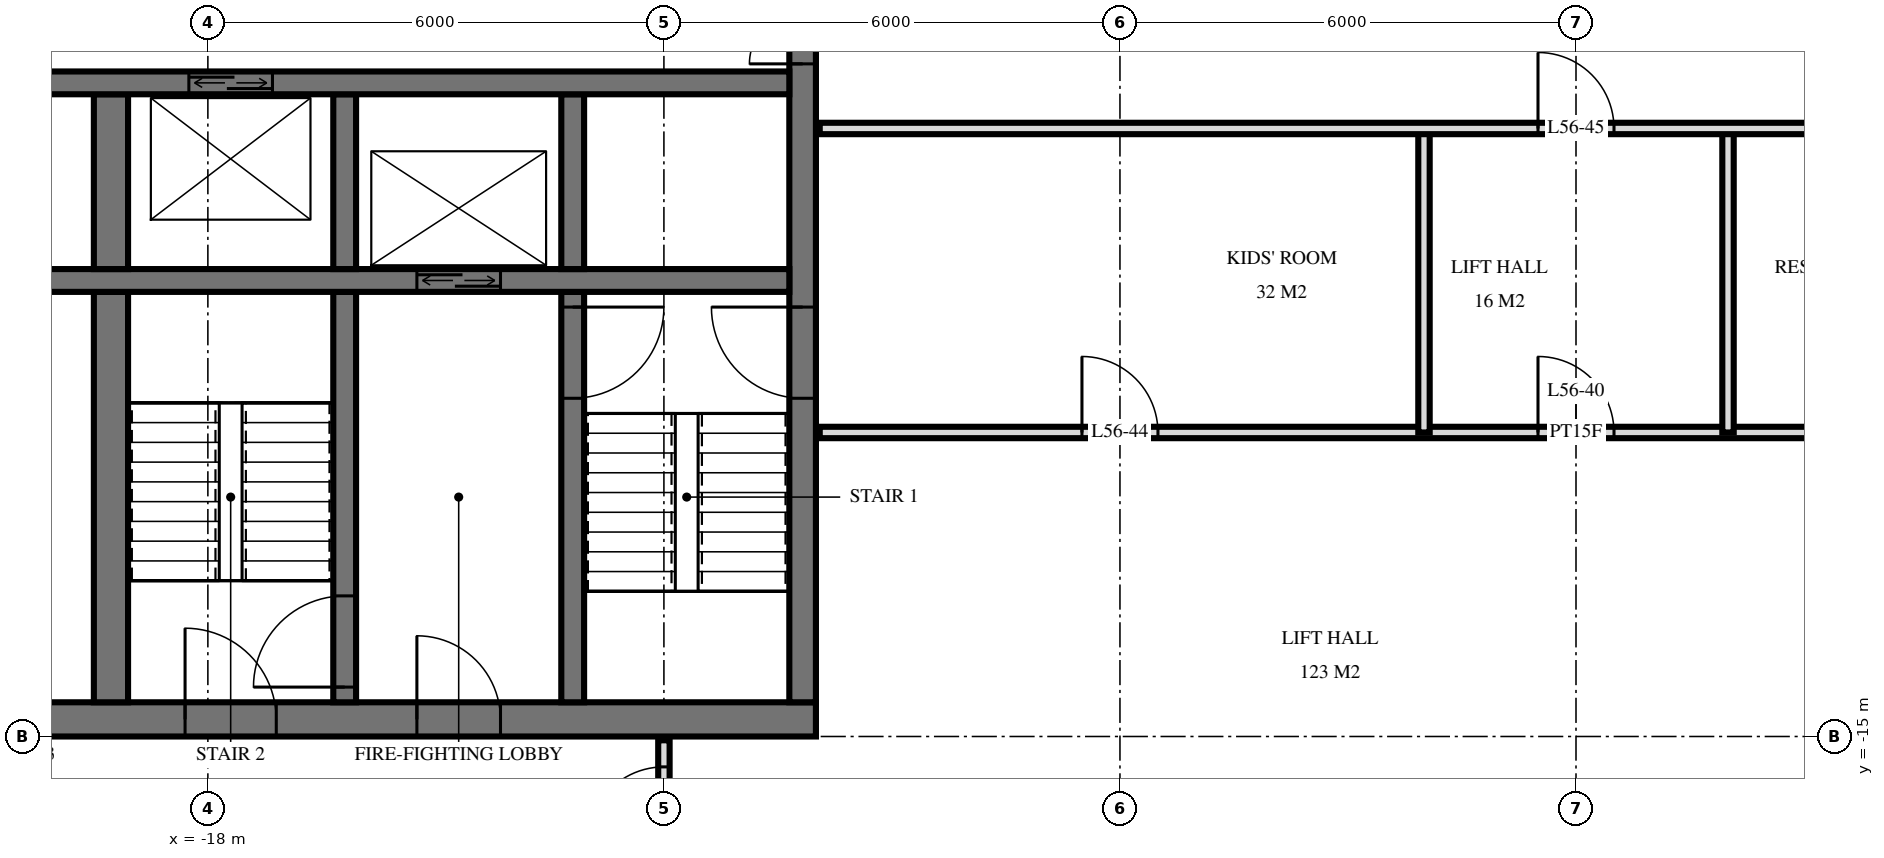
"""IFC4 building model, lengths in metres.
Left out: names, types, materials, properties, quantities, classifications, styles, units other than length and angle.
Written with IfcOpenShell. Run it as: python <this file> out.ifc"""

import sys

from ifc_helpers import new_model, si_unit, direction, frame, frame_2d, origin, place, context, subcontext, project, spatial, rectangle, extrude, element, fill, save


model = new_model("IFC4")
c1 = context("Model", 3, precision=1e-05, world=origin(), true_north=direction((0.0, 1.0)))
c2 = subcontext(c1, "Body", "Model", "MODEL_VIEW")
j1 = project(units=[si_unit("LENGTHUNIT", "METRE"), si_unit("PLANEANGLEUNIT", "RADIAN")], contexts=[c1])
p1 = place(None, origin())
s1 = spatial("IfcSite", under=j1, at=p1, CompositionType="ELEMENT")
p2 = place(p1, origin())
s2 = spatial("IfcBuilding", under=s1, at=p2, CompositionType="ELEMENT")
p3 = place(p2, frame((0.0, 0.0, 215.1)))
s3 = spatial("IfcBuildingStorey", under=s2, at=p3, CompositionType="ELEMENT", Elevation=215.1)
p4 = place(p3, frame((-24.5, -14.775, 0.0), z_axis=(0.0, 0.0, 1.0), x_axis=(1.0, 0.0, 0.0)))
e1 = element("IfcWall", 1, at=p4, inside=s3, PredefinedType="SHEAR", context=c2, shape_type="SweptSolid", body=[
    extrude(rectangle(XDim=14.5, YDim=0.45, at=frame_2d((7.25, 0.0))), origin(), (0.0, 0.0, 1.0), 3.5),
])
p5 = place(p4, frame((6.2, 0.0, 0.0)))
e2 = element("IfcOpeningElement", 2, at=p5, cuts=e1, PredefinedType="OPENING", context=c2, shape_type="SweptSolid", body=[
    extrude(rectangle(XDim=1.2, YDim=2.1, at=frame_2d((0.6, 1.05))), frame((0.0, 0.235, 0.0), z_axis=(0.0, -1.0, 0.0), x_axis=(1.0, 0.0, 0.0)), (0.0, 0.0, 1.0), 0.47),
])
p6 = place(p4, frame((9.25, 0.0, 0.0)))
e3 = element("IfcOpeningElement", 3, at=p6, cuts=e1, PredefinedType="OPENING", context=c2, shape_type="SweptSolid", body=[
    extrude(rectangle(XDim=1.1, YDim=2.1, at=frame_2d((0.55, 1.05))), frame((0.0, 0.235, 0.0), z_axis=(0.0, -1.0, 0.0), x_axis=(1.0, 0.0, 0.0)), (0.0, 0.0, 1.0), 0.47),
])
p7 = place(p4, frame((3.5, 0.0, 0.0)))
e4 = element("IfcOpeningElement", 4, at=p7, cuts=e1, PredefinedType="OPENING", context=c2, shape_type="SweptSolid", body=[
    extrude(rectangle(XDim=0.9, YDim=2.1, at=frame_2d((0.45, 1.05))), frame((0.0, 0.235, 0.0), z_axis=(0.0, -1.0, 0.0), x_axis=(1.0, 0.0, 0.0)), (0.0, 0.0, 1.0), 0.47),
])
p8 = place(p4, frame((1.05, 0.0, 0.0)))
e5 = element("IfcOpeningElement", 5, at=p8, cuts=e1, PredefinedType="OPENING", context=c2, shape_type="SweptSolid", body=[
    extrude(rectangle(XDim=1.0, YDim=2.1, at=frame_2d((0.5, 1.05))), frame((0.0, 0.235, 0.0), z_axis=(0.0, -1.0, 0.0), x_axis=(1.0, 0.0, 0.0)), (0.0, 0.0, 1.0), 0.47),
])
p9 = place(p3, frame((-10.175, -14.55, 0.0), z_axis=(0.0, 0.0, 1.0), x_axis=(0.0, 1.0, 0.0)))
e6 = element("IfcWall", 6, at=p9, inside=s3, PredefinedType="SHEAR", context=c2, shape_type="SweptSolid", body=[
    extrude(rectangle(XDim=14.1, YDim=0.35, at=frame_2d((7.05, 0.0))), origin(), (0.0, 0.0, 1.0), 3.5),
])
p10 = place(p9, frame((8.4, 0.0, 0.0)))
e7 = element("IfcOpeningElement", 7, at=p10, cuts=e6, PredefinedType="OPENING", context=c2, shape_type="SweptSolid", body=[
    extrude(rectangle(XDim=1.4, YDim=2.4, at=frame_2d((0.7, 1.2))), frame((0.0, 0.185, 0.0), z_axis=(0.0, -1.0, 0.0), x_axis=(1.0, 0.0, 0.0)), (0.0, 0.0, 1.0), 0.37),
])
p11 = place(p9, frame((10.0, 0.0, 0.0)))
e8 = element("IfcOpeningElement", 8, at=p11, cuts=e6, PredefinedType="OPENING", context=c2, shape_type="SweptSolid", body=[
    extrude(rectangle(XDim=1.4, YDim=2.4, at=frame_2d((0.7, 1.2))), frame((0.0, 0.185, 0.0), z_axis=(0.0, -1.0, 0.0), x_axis=(1.0, 0.0, 0.0)), (0.0, 0.0, 1.0), 0.37),
])
p12 = place(p9, frame((4.0, 0.0, 0.0)))
e9 = element("IfcOpeningElement", 9, at=p12, cuts=e6, PredefinedType="OPENING", context=c2, shape_type="SweptSolid", body=[
    extrude(rectangle(XDim=1.2, YDim=2.1, at=frame_2d((0.6, 1.05))), frame((0.0, 0.185, 0.0), z_axis=(0.0, -1.0, 0.0), x_axis=(1.0, 0.0, 0.0)), (0.0, 0.0, 1.0), 0.37),
])
p13 = place(p3, frame((-24.05, -6.4, 0.0), z_axis=(0.0, 0.0, 1.0), x_axis=(1.0, 0.0, 0.0)))
e10 = element("IfcWall", 10, at=p13, inside=s3, PredefinedType="SHEAR", context=c2, shape_type="SweptSolid", body=[
    extrude(rectangle(XDim=13.7, YDim=0.3, at=frame_2d((6.85, 0.0))), origin(), (0.0, 0.0, 1.0), 3.5),
])
p14 = place(p13, frame((0.55, 0.0, 0.0)))
e11 = element("IfcOpeningElement", 11, at=p14, cuts=e10, PredefinedType="OPENING", context=c2, shape_type="SweptSolid", body=[
    extrude(rectangle(XDim=1.1, YDim=2.1, at=frame_2d((0.55, 1.05))), frame((0.0, 0.16, 0.0), z_axis=(0.0, -1.0, 0.0), x_axis=(1.0, 0.0, 0.0)), (0.0, 0.0, 1.0), 0.32),
])
p15 = place(p13, frame((5.8, 0.0, 0.0)))
e12 = element("IfcOpeningElement", 12, at=p15, cuts=e10, PredefinedType="OPENING", context=c2, shape_type="SweptSolid", body=[
    extrude(rectangle(XDim=1.1, YDim=2.1, at=frame_2d((0.55, 1.05))), frame((0.0, 0.16, 0.0), z_axis=(0.0, -1.0, 0.0), x_axis=(1.0, 0.0, 0.0)), (0.0, 0.0, 1.0), 0.32),
])
p16 = place(p3, frame((-24.05, -9.0, 0.0), z_axis=(0.0, 0.0, 1.0), x_axis=(1.0, 0.0, 0.0)))
e13 = element("IfcWall", 13, at=p16, inside=s3, PredefinedType="SHEAR", context=c2, shape_type="SweptSolid", body=[
    extrude(rectangle(XDim=13.7, YDim=0.3, at=frame_2d((6.85, 0.0))), origin(), (0.0, 0.0, 1.0), 3.5),
])
p17 = place(p16, frame((8.8, 0.0, 0.0)))
e14 = element("IfcOpeningElement", 14, at=p17, cuts=e13, PredefinedType="OPENING", context=c2, shape_type="SweptSolid", body=[
    extrude(rectangle(XDim=1.1, YDim=2.1, at=frame_2d((0.55, 1.05))), frame((0.0, 0.16, 0.0), z_axis=(0.0, -1.0, 0.0), x_axis=(1.0, 0.0, 0.0)), (0.0, 0.0, 1.0), 0.32),
])
p18 = place(p3, frame((-13.2, -8.85, 0.0), z_axis=(0.0, 0.0, 1.0), x_axis=(0.0, 1.0, 0.0)))
e15 = element("IfcWall", 15, at=p18, inside=s3, PredefinedType="SHEAR", context=c2, shape_type="SweptSolid", body=[
    extrude(rectangle(XDim=2.3, YDim=0.3, at=frame_2d((1.15, 0.0))), origin(), (0.0, 0.0, 1.0), 3.5),
])
p19 = place(p3, frame((-13.2, -14.55, 0.0), z_axis=(0.0, 0.0, 1.0), x_axis=(0.0, 1.0, 0.0)))
e16 = element("IfcWall", 16, at=p19, inside=s3, PredefinedType="SHEAR", context=c2, shape_type="SweptSolid", body=[
    extrude(rectangle(XDim=5.4, YDim=0.3, at=frame_2d((2.7, 0.0))), origin(), (0.0, 0.0, 1.0), 3.5),
])
p20 = place(p19, frame((4.0, 0.0, 0.0)))
e17 = element("IfcOpeningElement", 17, at=p20, cuts=e16, PredefinedType="OPENING", context=c2, shape_type="SweptSolid", body=[
    extrude(rectangle(XDim=1.2, YDim=2.1, at=frame_2d((0.6, 1.05))), frame((0.0, 0.16, 0.0), z_axis=(0.0, -1.0, 0.0), x_axis=(1.0, 0.0, 0.0)), (0.0, 0.0, 1.0), 0.32),
])
p21 = place(p3, frame((-16.2, -8.85, 0.0), z_axis=(0.0, 0.0, 1.0), x_axis=(0.0, 1.0, 0.0)))
e18 = element("IfcWall", 18, at=p21, inside=s3, PredefinedType="SHEAR", context=c2, shape_type="SweptSolid", body=[
    extrude(rectangle(XDim=2.3, YDim=0.3, at=frame_2d((1.15, 0.0))), origin(), (0.0, 0.0, 1.0), 3.5),
])
p22 = place(p3, frame((-16.2, -14.55, 0.0), z_axis=(0.0, 0.0, 1.0), x_axis=(0.0, 1.0, 0.0)))
e19 = element("IfcWall", 19, at=p22, inside=s3, PredefinedType="SHEAR", context=c2, shape_type="SweptSolid", body=[
    extrude(rectangle(XDim=5.4, YDim=0.3, at=frame_2d((2.7, 0.0))), origin(), (0.0, 0.0, 1.0), 3.5),
])
p23 = place(p22, frame((0.2, 0.0, 0.0)))
e20 = element("IfcOpeningElement", 20, at=p23, cuts=e19, PredefinedType="OPENING", context=c2, shape_type="SweptSolid", body=[
    extrude(rectangle(XDim=1.2, YDim=2.1, at=frame_2d((0.6, 1.05))), frame((0.0, 0.16, 0.0), z_axis=(0.0, -1.0, 0.0), x_axis=(1.0, 0.0, 0.0)), (0.0, 0.0, 1.0), 0.32),
])
p24 = place(p3, frame((-19.275, -8.85, 0.0), z_axis=(0.0, 0.0, 1.0), x_axis=(0.0, 1.0, 0.0)))
e21 = element("IfcWall", 21, at=p24, inside=s3, PredefinedType="SHEAR", context=c2, shape_type="SweptSolid", body=[
    extrude(rectangle(XDim=2.3, YDim=0.45, at=frame_2d((1.15, 0.0))), origin(), (0.0, 0.0, 1.0), 3.5),
])
p25 = place(p3, frame((-19.275, -14.55, 0.0), z_axis=(0.0, 0.0, 1.0), x_axis=(0.0, 1.0, 0.0)))
e22 = element("IfcWall", 22, at=p25, inside=s3, PredefinedType="SHEAR", context=c2, shape_type="SweptSolid", body=[
    extrude(rectangle(XDim=5.4, YDim=0.45, at=frame_2d((2.7, 0.0))), origin(), (0.0, 0.0, 1.0), 3.5),
])
for number, where, z_axis, x_axis in (
    (23, (2.0, -11.0, 0.0), (0.0, 0.0, 1.0), (0.0, 1.0, 0.0)),
    (24, (-2.0, -11.0, 0.0), (0.0, 0.0, 1.0), (0.0, 1.0, 0.0)),
):
    element("IfcWall", number, at=place(p3, frame(where, z_axis=z_axis, x_axis=x_axis)), inside=s3, PredefinedType="PARTITIONING", context=c2, shape_type="SweptSolid", body=[
        extrude(rectangle(XDim=4.0, YDim=0.15, at=frame_2d((2.0, 0.0))), origin(), (0.0, 0.0, 1.0), 3.22),
    ])
p26 = place(p3, frame((-12.0, -16.8, 0.0), z_axis=(0.0, 0.0, 1.0), x_axis=(0.0, 1.0, 0.0)))
e25 = element("IfcWall", 25, at=p26, inside=s3, PredefinedType="PARTITIONING", context=c2, shape_type="SweptSolid", body=[
    extrude(rectangle(XDim=1.75, YDim=0.15, at=frame_2d((0.875, 0.0))), origin(), (0.0, 0.0, 1.0), 3.22),
])
p27 = place(p26, frame((0.4, 0.0, 0.0)))
e26 = element("IfcOpeningElement", 26, at=p27, cuts=e25, PredefinedType="OPENING", context=c2, shape_type="SweptSolid", body=[
    extrude(rectangle(XDim=1.0, YDim=2.1, at=frame_2d((0.5, 1.05))), frame((0.0, 0.085, 0.0), z_axis=(0.0, -1.0, 0.0), x_axis=(1.0, 0.0, 0.0)), (0.0, 0.0, 1.0), 0.17),
])
p28 = place(p3, frame((-9.95, -11.0, 0.0), z_axis=(0.0, 0.0, 1.0), x_axis=(1.0, 0.0, 0.0)))
e27 = element("IfcWall", 27, at=p28, inside=s3, PredefinedType="PARTITIONING", context=c2, shape_type="SweptSolid", body=[
    extrude(rectangle(XDim=19.9, YDim=0.15, at=frame_2d((9.95, 0.0))), origin(), (0.0, 0.0, 1.0), 3.22),
])
p29 = place(p28, frame((9.45, 0.0, 0.0)))
e28 = element("IfcOpeningElement", 28, at=p29, cuts=e27, PredefinedType="OPENING", context=c2, shape_type="SweptSolid", body=[
    extrude(rectangle(XDim=1.0, YDim=2.1, at=frame_2d((0.5, 1.05))), frame((0.0, 0.085, 0.0), z_axis=(0.0, -1.0, 0.0), x_axis=(1.0, 0.0, 0.0)), (0.0, 0.0, 1.0), 0.17),
])
p30 = place(p28, frame((3.45, 0.0, 0.0)))
e29 = element("IfcOpeningElement", 29, at=p30, cuts=e27, PredefinedType="OPENING", context=c2, shape_type="SweptSolid", body=[
    extrude(rectangle(XDim=1.0, YDim=2.1, at=frame_2d((0.5, 1.05))), frame((0.0, 0.085, 0.0), z_axis=(0.0, -1.0, 0.0), x_axis=(1.0, 0.0, 0.0)), (0.0, 0.0, 1.0), 0.17),
])
p31 = place(p3, frame((-9.95, -7.0, 0.0), z_axis=(0.0, 0.0, 1.0), x_axis=(1.0, 0.0, 0.0)))
e30 = element("IfcWall", 30, at=p31, inside=s3, PredefinedType="PARTITIONING", context=c2, shape_type="SweptSolid", body=[
    extrude(rectangle(XDim=19.9, YDim=0.15, at=frame_2d((9.95, 0.0))), origin(), (0.0, 0.0, 1.0), 3.22),
])
p32 = place(p31, frame((9.45, 0.0, 0.0)))
e31 = element("IfcOpeningElement", 31, at=p32, cuts=e30, PredefinedType="OPENING", context=c2, shape_type="SweptSolid", body=[
    extrude(rectangle(XDim=1.0, YDim=2.1, at=frame_2d((0.5, 1.05))), frame((0.0, 0.085, 0.0), z_axis=(0.0, -1.0, 0.0), x_axis=(1.0, 0.0, 0.0)), (0.0, 0.0, 1.0), 0.17),
])
p33 = place(p31, frame((15.45, 0.0, 0.0)))
e32 = element("IfcOpeningElement", 32, at=p33, cuts=e30, PredefinedType="OPENING", context=c2, shape_type="SweptSolid", body=[
    extrude(rectangle(XDim=1.0, YDim=2.1, at=frame_2d((0.5, 1.05))), frame((0.0, 0.085, 0.0), z_axis=(0.0, -1.0, 0.0), x_axis=(1.0, 0.0, 0.0)), (0.0, 0.0, 1.0), 0.17),
])
p34 = place(p17, origin())
e33 = element("IfcDoor", 33, at=p34, inside=s3, OperationType="DOUBLE_DOOR_SLIDING", PredefinedType="USERDEFINED", context=c2, shape_type="SweptSolid", body=[
    extrude(rectangle(XDim=1.1, YDim=2.1, at=frame_2d((0.55, 1.05))), frame((0.0, 0.025, 0.0), z_axis=(0.0, -1.0, 0.0), x_axis=(1.0, 0.0, 0.0)), (0.0, 0.0, 1.0), 0.05),
])
fill(e14, e33)
p35 = place(p15, origin())
e34 = element("IfcDoor", 34, at=p35, inside=s3, OperationType="DOUBLE_DOOR_SLIDING", PredefinedType="USERDEFINED", context=c2, shape_type="SweptSolid", body=[
    extrude(rectangle(XDim=1.1, YDim=2.1, at=frame_2d((0.55, 1.05))), frame((0.0, 0.025, 0.0), z_axis=(0.0, -1.0, 0.0), x_axis=(1.0, 0.0, 0.0)), (0.0, 0.0, 1.0), 0.05),
])
fill(e12, e34)
p36 = place(p10, origin())
e35 = element("IfcDoor", 35, at=p36, inside=s3, OperationType="DOUBLE_DOOR_SINGLE_SWING", PredefinedType="DOOR", context=c2, shape_type="SweptSolid", body=[
    extrude(rectangle(XDim=1.4, YDim=2.4, at=frame_2d((0.7, 1.2))), frame((0.0, 0.025, 0.0), z_axis=(0.0, -1.0, 0.0), x_axis=(1.0, 0.0, 0.0)), (0.0, 0.0, 1.0), 0.05),
])
fill(e7, e35)
p37 = place(p12, origin())
e36 = element("IfcDoor", 36, at=p37, inside=s3, OperationType="SINGLE_SWING_LEFT", PredefinedType="DOOR", context=c2, shape_type="SweptSolid", body=[
    extrude(rectangle(XDim=1.2, YDim=2.1, at=frame_2d((0.6, 1.05))), frame((0.0, 0.025, 0.0), z_axis=(0.0, -1.0, 0.0), x_axis=(1.0, 0.0, 0.0)), (0.0, 0.0, 1.0), 0.05),
])
fill(e9, e36)
p38 = place(p5, origin())
e37 = element("IfcDoor", 37, at=p38, inside=s3, OperationType="SINGLE_SWING_RIGHT", PredefinedType="DOOR", context=c2, shape_type="SweptSolid", body=[
    extrude(rectangle(XDim=1.2, YDim=2.1, at=frame_2d((0.6, 1.05))), frame((0.0, 0.025, 0.0), z_axis=(0.0, -1.0, 0.0), x_axis=(1.0, 0.0, 0.0)), (0.0, 0.0, 1.0), 0.05),
])
fill(e2, e37)
p39 = place(p6, origin())
e38 = element("IfcDoor", 38, at=p39, inside=s3, OperationType="SINGLE_SWING_RIGHT", PredefinedType="DOOR", context=c2, shape_type="SweptSolid", body=[
    extrude(rectangle(XDim=1.1, YDim=2.1, at=frame_2d((0.55, 1.05))), frame((0.0, 0.025, 0.0), z_axis=(0.0, -1.0, 0.0), x_axis=(1.0, 0.0, 0.0)), (0.0, 0.0, 1.0), 0.05),
])
fill(e3, e38)
p40 = place(p20, frame((0.6, 0.0, 0.0), z_axis=(0.0, 0.0, 1.0), x_axis=(-1.0, 0.0, 0.0)))
e39 = element("IfcDoor", 39, at=p40, inside=s3, OperationType="SINGLE_SWING_RIGHT", PredefinedType="DOOR", context=c2, shape_type="SweptSolid", body=[
    extrude(rectangle(XDim=1.2, YDim=2.1, at=frame_2d((0.0, 1.05))), frame((0.0, -0.025, 0.0), z_axis=(0.0, 1.0, 0.0), x_axis=(-1.0, 0.0, 0.0)), (0.0, 0.0, 1.0), 0.05),
])
fill(e17, e39)
p41 = place(p23, origin())
e40 = element("IfcDoor", 40, at=p41, inside=s3, OperationType="SINGLE_SWING_RIGHT", PredefinedType="DOOR", context=c2, shape_type="SweptSolid", body=[
    extrude(rectangle(XDim=1.2, YDim=2.1, at=frame_2d((0.6, 1.05))), frame((0.0, 0.025, 0.0), z_axis=(0.0, -1.0, 0.0), x_axis=(1.0, 0.0, 0.0)), (0.0, 0.0, 1.0), 0.05),
])
fill(e20, e40)
p42 = place(p27, origin())
e41 = element("IfcDoor", 41, at=p42, inside=s3, OperationType="SINGLE_SWING_RIGHT", PredefinedType="DOOR", context=c2, shape_type="SweptSolid", body=[
    extrude(rectangle(XDim=1.0, YDim=2.1, at=frame_2d((0.5, 1.05))), frame((0.0, 0.025, 0.0), z_axis=(0.0, -1.0, 0.0), x_axis=(1.0, 0.0, 0.0)), (0.0, 0.0, 1.0), 0.05),
])
fill(e26, e41)
p43 = place(p29, origin())
e42 = element("IfcDoor", 42, at=p43, inside=s3, OperationType="SINGLE_SWING_RIGHT", PredefinedType="DOOR", context=c2, shape_type="SweptSolid", body=[
    extrude(rectangle(XDim=1.0, YDim=2.1, at=frame_2d((0.5, 1.05))), frame((0.0, 0.025, 0.0), z_axis=(0.0, -1.0, 0.0), x_axis=(1.0, 0.0, 0.0)), (0.0, 0.0, 1.0), 0.05),
])
fill(e28, e42)
p44 = place(p30, origin())
e43 = element("IfcDoor", 43, at=p44, inside=s3, OperationType="SINGLE_SWING_RIGHT", PredefinedType="DOOR", context=c2, shape_type="SweptSolid", body=[
    extrude(rectangle(XDim=1.0, YDim=2.1, at=frame_2d((0.5, 1.05))), frame((0.0, 0.025, 0.0), z_axis=(0.0, -1.0, 0.0), x_axis=(1.0, 0.0, 0.0)), (0.0, 0.0, 1.0), 0.05),
])
fill(e29, e43)
p45 = place(p32, origin())
e44 = element("IfcDoor", 44, at=p45, inside=s3, OperationType="SINGLE_SWING_RIGHT", PredefinedType="DOOR", context=c2, shape_type="SweptSolid", body=[
    extrude(rectangle(XDim=1.0, YDim=2.1, at=frame_2d((0.5, 1.05))), frame((0.0, 0.025, 0.0), z_axis=(0.0, -1.0, 0.0), x_axis=(1.0, 0.0, 0.0)), (0.0, 0.0, 1.0), 0.05),
])
fill(e31, e44)
save(model, sys.argv[1])
